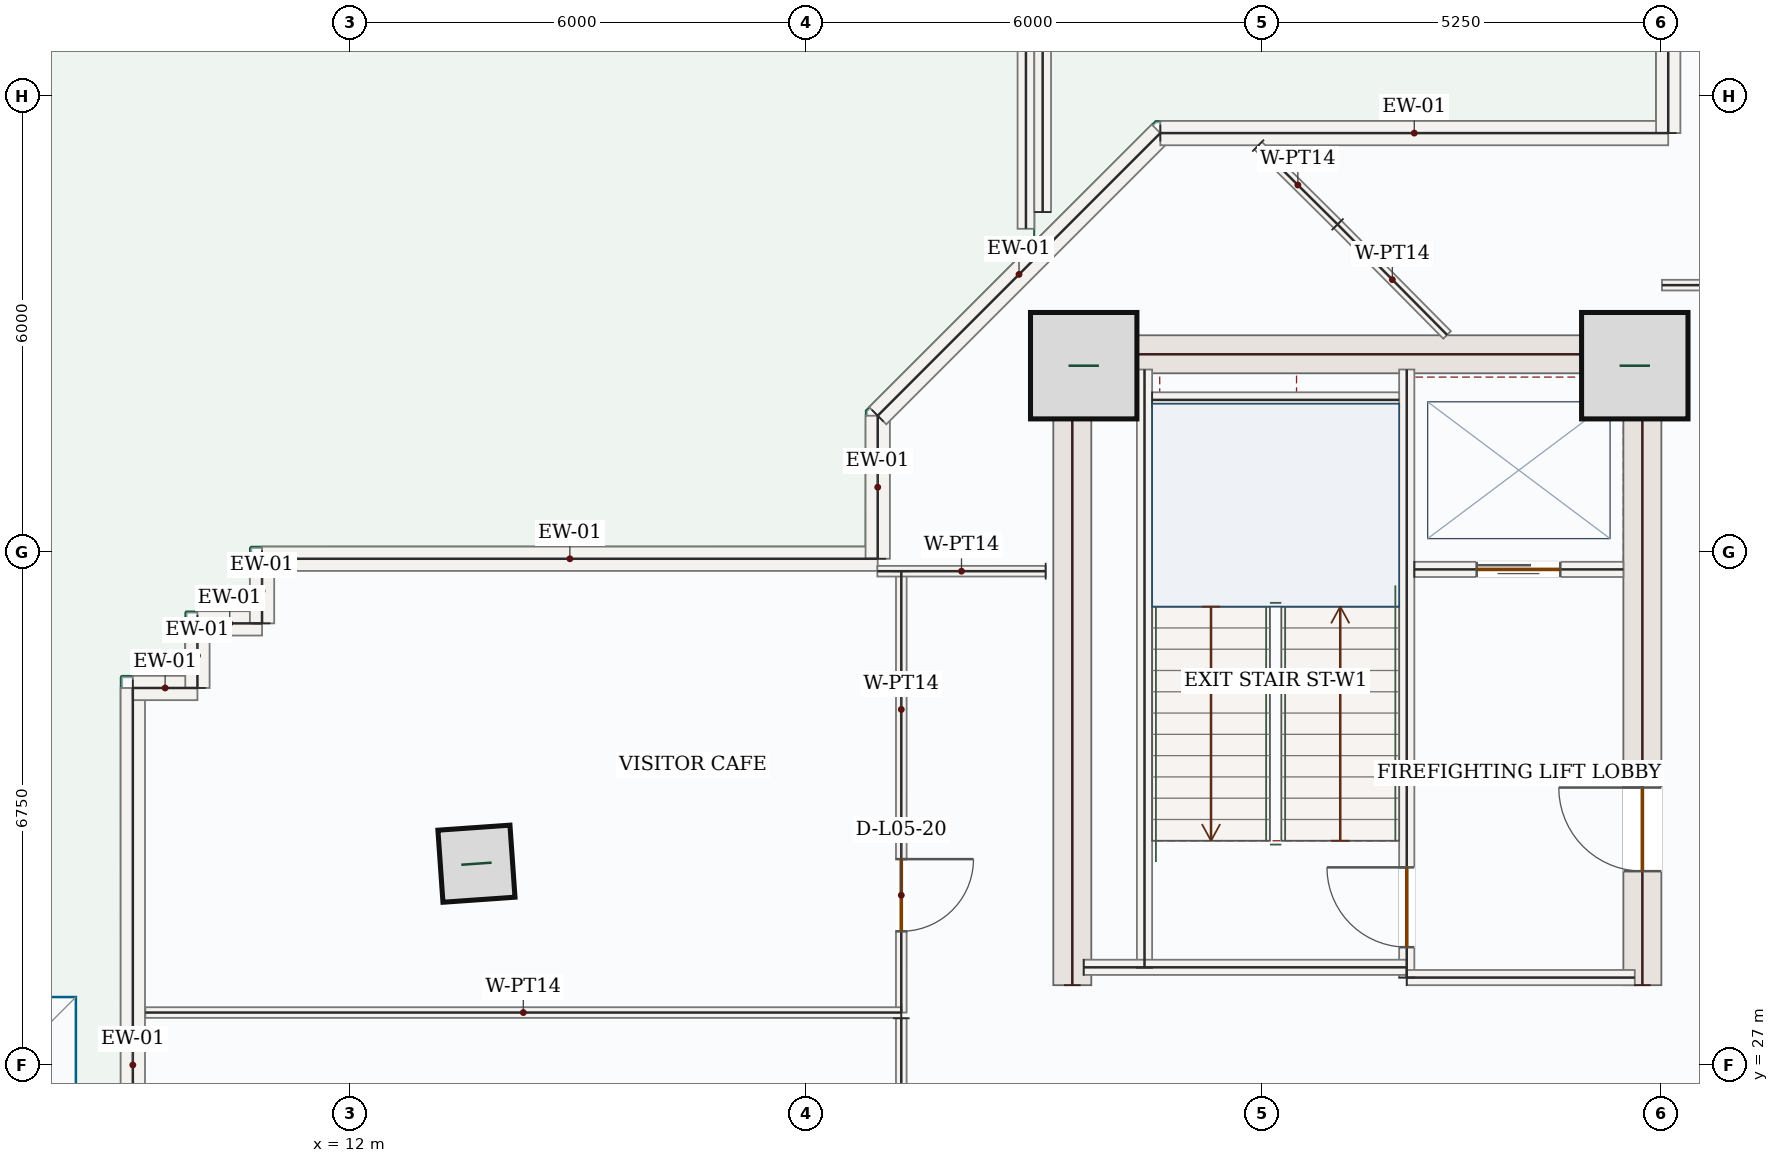
"""IFC4 building model, lengths in metres.
Left out: names, types, materials, properties, quantities, classifications, styles, units other than length and angle.
Written with IfcOpenShell. Run it as: python <this file> out.ifc"""

import sys

from ifc_helpers import new_model, si_unit, direction, frame, frame_2d, origin, origin_2d, place, context, subcontext, project, spatial, rectangle, hollow_rectangle, extrude, source, transform, mapped, element, fill, save


model = new_model("IFC4")
c1 = context("Model", 3, precision=1e-05, world=origin(), true_north=direction((0.0, 1.0)))
c2 = subcontext(c1, "Body", "Model", "MODEL_VIEW")
j1 = project(units=[si_unit("LENGTHUNIT", "METRE"), si_unit("PLANEANGLEUNIT", "RADIAN")], contexts=[c1])
p1 = place(None, origin())
s1 = spatial("IfcSite", under=j1, at=p1, CompositionType="ELEMENT")
p2 = place(p1, origin())
s2 = spatial("IfcBuilding", under=s1, at=p2, CompositionType="ELEMENT")
p3 = place(p2, frame((0.0, 0.0, 29.1)))
s3 = spatial("IfcBuildingStorey", under=s2, at=p3, CompositionType="ELEMENT", Elevation=29.1)
m1 = source(origin(), c2, "Body", "SweptSolid", [
    extrude(rectangle(XDim=8.55, YDim=0.5, at=frame_2d((4.275, 0.0))), origin(), (0.0, 0.0, 1.0), 3.95),
])
p4 = place(p3, frame((21.5, 28.05, 0.0), z_axis=(0.0, 0.0, 1.0), x_axis=(0.0, 1.0, 0.0)))
e1 = element("IfcWall", 1, at=p4, inside=s3, PredefinedType="SHEAR", context=c2, shape_type="MappedRepresentation", body=[
    mapped(m1, transform((0.0, 0.0, 0.0), x_axis=(1.0, 0.0, 0.0), y_axis=(0.0, 1.0, 0.0), z_axis=(0.0, 0.0, 1.0), scale=1.0)),
])
p5 = place(p3, frame((29.0, 28.05, 0.0), z_axis=(0.0, 0.0, 1.0), x_axis=(0.0, 1.0, 0.0)))
e2 = element("IfcWall", 2, at=p5, inside=s3, PredefinedType="SHEAR", context=c2, shape_type="SweptSolid", body=[
    extrude(rectangle(XDim=8.55, YDim=0.5, at=frame_2d((4.275, 0.0))), origin(), (0.0, 0.0, 1.0), 3.95),
])
p6 = place(p5, frame((1.5, 0.0, 0.0)))
e3 = element("IfcOpeningElement", 3, at=p6, cuts=e2, PredefinedType="OPENING", context=c2, shape_type="SweptSolid", body=[
    extrude(rectangle(XDim=1.1, YDim=2.2, at=frame_2d((0.55, 1.1))), frame((0.0, 0.26, 0.0), z_axis=(0.0, -1.0, 0.0), x_axis=(1.0, 0.0, 0.0)), (0.0, 0.0, 1.0), 0.52),
])
m2 = source(origin(), c2, "Body", "SweptSolid", [
    extrude(rectangle(XDim=7.0, YDim=0.5, at=frame_2d((3.5, 0.0))), origin(), (0.0, 0.0, 1.0), 3.95),
])
p7 = place(p3, frame((21.75, 36.35, 0.0), z_axis=(0.0, 0.0, 1.0), x_axis=(1.0, 0.0, 0.0)))
e4 = element("IfcWall", 4, at=p7, inside=s3, PredefinedType="SHEAR", context=c2, shape_type="MappedRepresentation", body=[
    mapped(m2, transform((0.0, 0.0, 0.0), x_axis=(1.0, 0.0, 0.0), y_axis=(0.0, 1.0, 0.0), z_axis=(0.0, 0.0, 1.0), scale=1.0)),
])
m3 = source(origin(), c2, "Body", "SweptSolid", [
    extrude(rectangle(XDim=1.4, YDim=1.4, at=origin_2d()), origin(), (0.0, 0.0, 1.0), 4.2),
])
for number, where, z_axis, x_axis in (
    (5, (21.65, 36.2, 0.0), (0.0, 0.0, 1.0), (1.0, 0.0, 0.0)),
    (6, (28.9, 36.2, 0.0), (0.0, 0.0, 1.0), (1.0, 0.0, 0.0)),
):
    element("IfcColumn", number, at=place(p3, frame(where, z_axis=z_axis, x_axis=x_axis)), inside=s3, PredefinedType="COLUMN", context=c2, shape_type="MappedRepresentation", body=[
        mapped(m3, transform((0.0, 0.0, 0.0), x_axis=(1.0, 0.0, 0.0), y_axis=(0.0, 1.0, 0.0), z_axis=(0.0, 0.0, 1.0), scale=1.0)),
    ])
m4 = source(origin(), c2, "Body", "SweptSolid", [
    extrude(hollow_rectangle(XDim=0.95, YDim=0.95, WallThickness=0.05, at=origin_2d()), origin(), (0.0, 0.0, 1.0), 4.2),
])
p8 = place(p3, frame((13.661, 29.648, 0.0), z_axis=(0.0, 0.0, 1.0), x_axis=(0.99756405026, 0.069756473744, 0.0)))
e7 = element("IfcColumn", 7, at=p8, inside=s3, PredefinedType="COLUMN", context=c2, shape_type="MappedRepresentation", body=[
    mapped(m4, transform((0.0, 0.0, 0.0), x_axis=(1.0, 0.0, 0.0), y_axis=(0.0, 1.0, 0.0), z_axis=(0.0, 0.0, 1.0), scale=1.0)),
])
m5 = source(origin(), c2, "Body", "SweptSolid", [
    extrude(rectangle(XDim=10.889, YDim=0.22, at=frame_2d((5.444, 0.0))), origin(), (0.0, 0.0, 1.0), 1.2),
])
p9 = place(p3, frame((20.89, 48.89, 0.0), z_axis=(0.0, 0.0, 1.0), x_axis=(0.0, -1.0, 0.0)))
e8 = element("IfcWall", 8, at=p9, inside=s3, PredefinedType="PARAPET", context=c2, shape_type="MappedRepresentation", body=[
    mapped(m5, transform((0.0, 0.0, 0.0), x_axis=(1.0, 0.0, 0.0), y_axis=(0.0, 1.0, 0.0), z_axis=(0.0, 0.0, 1.0), scale=1.0)),
])
m6 = source(origin(), c2, "Body", "SweptSolid", [
    extrude(rectangle(XDim=10.669, YDim=0.22, at=frame_2d((5.334, 0.0))), origin(), (0.0, 0.0, 1.0), 1.2),
])
p10 = place(p3, frame((21.11, 38.221, 0.0), z_axis=(0.0, 0.0, 1.0), x_axis=(0.0, 1.0, 0.0)))
e9 = element("IfcWall", 9, at=p10, inside=s3, PredefinedType="PARAPET", context=c2, shape_type="MappedRepresentation", body=[
    mapped(m6, transform((0.0, 0.0, 0.0), x_axis=(1.0, 0.0, 0.0), y_axis=(0.0, 1.0, 0.0), z_axis=(0.0, 0.0, 1.0), scale=1.0)),
])
m7 = source(origin(), c2, "Body", "SweptSolid", [
    extrude(rectangle(XDim=9.92, YDim=0.32, at=frame_2d((4.96, 0.0))), origin(), (0.0, 0.0, 1.0), 3.95),
])
p11 = place(p3, frame((9.14, 22.04, 0.0), z_axis=(0.0, 0.0, 1.0), x_axis=(0.0, 1.0, 0.0)))
e10 = element("IfcWall", 10, at=p11, inside=s3, PredefinedType="SOLIDWALL", context=c2, shape_type="MappedRepresentation", body=[
    mapped(m7, transform((0.0, 0.0, 0.0), x_axis=(1.0, 0.0, 0.0), y_axis=(0.0, 1.0, 0.0), z_axis=(0.0, 0.0, 1.0), scale=1.0)),
])
m8 = source(origin(), c2, "Body", "SweptSolid", [
    extrude(rectangle(XDim=0.85, YDim=0.32, at=frame_2d((0.425, 0.0))), origin(), (0.0, 0.0, 1.0), 3.95),
])
for number, where, z_axis, x_axis in (
    (11, (9.14, 31.96, 0.0), (0.0, 0.0, 1.0), (1.0, 0.0, 0.0)),
    (12, (9.99, 31.96, 0.0), (0.0, 0.0, 1.0), (0.0, 1.0, 0.0)),
    (13, (9.99, 32.81, 0.0), (0.0, 0.0, 1.0), (1.0, 0.0, 0.0)),
):
    element("IfcWall", number, at=place(p3, frame(where, z_axis=z_axis, x_axis=x_axis)), inside=s3, PredefinedType="SOLIDWALL", context=c2, shape_type="MappedRepresentation", body=[
        mapped(m8, transform((0.0, 0.0, 0.0), x_axis=(1.0, 0.0, 0.0), y_axis=(0.0, 1.0, 0.0), z_axis=(0.0, 0.0, 1.0), scale=1.0)),
    ])
m9 = source(origin(), c2, "Body", "SweptSolid", [
    extrude(rectangle(XDim=0.85, YDim=0.32, at=frame_2d((0.425, 0.0))), origin(), (0.0, 0.0, 1.0), 3.95),
])
p12 = place(p3, frame((10.84, 32.81, 0.0), z_axis=(0.0, 0.0, 1.0), x_axis=(0.0, 1.0, 0.0)))
e14 = element("IfcWall", 14, at=p12, inside=s3, PredefinedType="SOLIDWALL", context=c2, shape_type="MappedRepresentation", body=[
    mapped(m9, transform((0.0, 0.0, 0.0), x_axis=(1.0, 0.0, 0.0), y_axis=(0.0, 1.0, 0.0), z_axis=(0.0, 0.0, 1.0), scale=1.0)),
])
m10 = source(origin(), c2, "Body", "SweptSolid", [
    extrude(rectangle(XDim=8.1, YDim=0.32, at=frame_2d((4.05, 0.0))), origin(), (0.0, 0.0, 1.0), 3.95),
])
p13 = place(p3, frame((10.84, 33.66, 0.0), z_axis=(0.0, 0.0, 1.0), x_axis=(1.0, 0.0, 0.0)))
e15 = element("IfcWall", 15, at=p13, inside=s3, PredefinedType="SOLIDWALL", context=c2, shape_type="MappedRepresentation", body=[
    mapped(m10, transform((0.0, 0.0, 0.0), x_axis=(1.0, 0.0, 0.0), y_axis=(0.0, 1.0, 0.0), z_axis=(0.0, 0.0, 1.0), scale=1.0)),
])
m11 = source(origin(), c2, "Body", "SweptSolid", [
    extrude(rectangle(XDim=1.882, YDim=0.32, at=frame_2d((0.941, 0.0))), origin(), (0.0, 0.0, 1.0), 3.95),
])
p14 = place(p3, frame((18.94, 33.66, 0.0), z_axis=(0.0, 0.0, 1.0), x_axis=(0.0, 1.0, 0.0)))
e16 = element("IfcWall", 16, at=p14, inside=s3, PredefinedType="SOLIDWALL", context=c2, shape_type="MappedRepresentation", body=[
    mapped(m11, transform((0.0, 0.0, 0.0), x_axis=(1.0, 0.0, 0.0), y_axis=(0.0, 1.0, 0.0), z_axis=(0.0, 0.0, 1.0), scale=1.0)),
])
m12 = source(origin(), c2, "Body", "SweptSolid", [
    extrude(rectangle(XDim=5.258, YDim=0.32, at=frame_2d((2.629, 0.0))), origin(), (0.0, 0.0, 1.0), 3.95),
])
p15 = place(p3, frame((18.94, 35.542, 0.0), z_axis=(0.0, 0.0, 1.0), x_axis=(0.707106781187, 0.707106781187, 0.0)))
e17 = element("IfcWall", 17, at=p15, inside=s3, PredefinedType="SOLIDWALL", context=c2, shape_type="MappedRepresentation", body=[
    mapped(m12, transform((0.0, 0.0, 0.0), x_axis=(1.0, 0.0, 0.0), y_axis=(0.0, 1.0, 0.0), z_axis=(0.0, 0.0, 1.0), scale=1.0)),
])
m13 = source(origin(), c2, "Body", "SweptSolid", [
    extrude(rectangle(XDim=6.682, YDim=0.32, at=frame_2d((3.341, 0.0))), origin(), (0.0, 0.0, 1.0), 3.95),
])
p16 = place(p3, frame((22.658, 39.26, 0.0), z_axis=(0.0, 0.0, 1.0), x_axis=(1.0, 0.0, 0.0)))
e18 = element("IfcWall", 18, at=p16, inside=s3, PredefinedType="SOLIDWALL", context=c2, shape_type="MappedRepresentation", body=[
    mapped(m13, transform((0.0, 0.0, 0.0), x_axis=(1.0, 0.0, 0.0), y_axis=(0.0, 1.0, 0.0), z_axis=(0.0, 0.0, 1.0), scale=1.0)),
])
m14 = source(origin(), c2, "Body", "SweptSolid", [
    extrude(rectangle(XDim=11.9, YDim=0.32, at=frame_2d((5.95, 0.0))), origin(), (0.0, 0.0, 1.0), 3.01),
])
p17 = place(p3, frame((29.34, 39.26, 0.0), z_axis=(0.0, 0.0, 1.0), x_axis=(0.0, 1.0, 0.0)))
e19 = element("IfcWall", 19, at=p17, inside=s3, PredefinedType="SOLIDWALL", context=c2, shape_type="MappedRepresentation", body=[
    mapped(m14, transform((0.0, 0.0, 0.0), x_axis=(1.0, 0.0, 0.0), y_axis=(0.0, 1.0, 0.0), z_axis=(0.0, 0.0, 1.0), scale=1.0)),
])
m15 = source(origin(), c2, "Body", "SweptSolid", [
    extrude(rectangle(XDim=7.87, YDim=0.2, at=frame_2d((3.935, 0.0))), origin(), (0.0, 0.0, 1.0), 3.95),
])
p18 = place(p3, frame((22.45, 28.28, 0.0), z_axis=(0.0, 0.0, 1.0), x_axis=(0.0, 1.0, 0.0)))
e20 = element("IfcWall", 20, at=p18, inside=s3, PredefinedType="SOLIDWALL", context=c2, shape_type="MappedRepresentation", body=[
    mapped(m15, transform((0.0, 0.0, 0.0), x_axis=(1.0, 0.0, 0.0), y_axis=(0.0, 1.0, 0.0), z_axis=(0.0, 0.0, 1.0), scale=1.0)),
])
p19 = place(p3, frame((25.9, 28.15, 0.0), z_axis=(0.0, 0.0, 1.0), x_axis=(0.0, 1.0, 0.0)))
e21 = element("IfcWall", 21, at=p19, inside=s3, PredefinedType="SOLIDWALL", context=c2, shape_type="SweptSolid", body=[
    extrude(rectangle(XDim=8.0, YDim=0.2, at=frame_2d((4.0, 0.0))), origin(), (0.0, 0.0, 1.0), 3.95),
])
p20 = place(p19, frame((0.4, 0.0, 0.0)))
e22 = element("IfcOpeningElement", 22, at=p20, cuts=e21, PredefinedType="OPENING", context=c2, shape_type="SweptSolid", body=[
    extrude(rectangle(XDim=1.05, YDim=2.15, at=frame_2d((0.525, 1.075))), frame((0.0, 0.11, 0.0), z_axis=(0.0, -1.0, 0.0), x_axis=(1.0, 0.0, 0.0)), (0.0, 0.0, 1.0), 0.22),
])
m16 = source(origin(), c2, "Body", "SweptSolid", [
    extrude(rectangle(XDim=4.25, YDim=0.2, at=frame_2d((2.125, 0.0))), origin(), (0.0, 0.0, 1.0), 3.95),
])
p21 = place(p3, frame((21.65, 28.285, 0.0), z_axis=(0.0, 0.0, 1.0), x_axis=(1.0, 0.0, 0.0)))
e23 = element("IfcWall", 23, at=p21, inside=s3, PredefinedType="SOLIDWALL", context=c2, shape_type="MappedRepresentation", body=[
    mapped(m16, transform((0.0, 0.0, 0.0), x_axis=(1.0, 0.0, 0.0), y_axis=(0.0, 1.0, 0.0), z_axis=(0.0, 0.0, 1.0), scale=1.0)),
])
m17 = source(origin(), c2, "Body", "SweptSolid", [
    extrude(rectangle(XDim=3.0, YDim=0.2, at=frame_2d((1.5, 0.0))), origin(), (0.0, 0.0, 1.0), 3.95),
])
p22 = place(p3, frame((25.9, 28.15, 0.0), z_axis=(0.0, 0.0, 1.0), x_axis=(1.0, 0.0, 0.0)))
e24 = element("IfcWall", 24, at=p22, inside=s3, PredefinedType="SOLIDWALL", context=c2, shape_type="MappedRepresentation", body=[
    mapped(m17, transform((0.0, 0.0, 0.0), x_axis=(1.0, 0.0, 0.0), y_axis=(0.0, 1.0, 0.0), z_axis=(0.0, 0.0, 1.0), scale=1.0)),
])
m18 = source(origin(), c2, "Body", "SweptSolid", [
    extrude(rectangle(XDim=3.25, YDim=0.2, at=frame_2d((1.625, 0.0))), origin(), (0.0, 0.0, 1.0), 3.95),
])
p23 = place(p3, frame((22.55, 35.75, 0.0), z_axis=(0.0, 0.0, 1.0), x_axis=(1.0, 0.0, 0.0)))
e25 = element("IfcWall", 25, at=p23, inside=s3, PredefinedType="SOLIDWALL", context=c2, shape_type="MappedRepresentation", body=[
    mapped(m18, transform((0.0, 0.0, 0.0), x_axis=(1.0, 0.0, 0.0), y_axis=(0.0, 1.0, 0.0), z_axis=(0.0, 0.0, 1.0), scale=1.0)),
])
p24 = place(p3, frame((26.0, 33.52, 0.0), z_axis=(0.0, 0.0, 1.0), x_axis=(1.0, 0.0, 0.0)))
e26 = element("IfcWall", 26, at=p24, inside=s3, PredefinedType="SOLIDWALL", context=c2, shape_type="SweptSolid", body=[
    extrude(rectangle(XDim=2.75, YDim=0.2, at=frame_2d((1.375, 0.0))), origin(), (0.0, 0.0, 1.0), 3.95),
])
p25 = place(p24, frame((0.82, 0.0, 0.0)))
e27 = element("IfcOpeningElement", 27, at=p25, cuts=e26, PredefinedType="OPENING", context=c2, shape_type="SweptSolid", body=[
    extrude(rectangle(XDim=1.1, YDim=2.15, at=frame_2d((0.55, 1.075))), frame((0.0, 0.11, 0.0), z_axis=(0.0, -1.0, 0.0), x_axis=(1.0, 0.0, 0.0)), (0.0, 0.0, 1.0), 0.22),
])
p26 = place(p3, frame((19.25, 33.496, 0.0), z_axis=(0.0, 0.0, 1.0), x_axis=(-8.409368e-05, -0.999999996464, 0.0)))
e28 = element("IfcWall", 28, at=p26, inside=s3, PredefinedType="PARTITIONING", context=c2, shape_type="SweptSolid", body=[
    extrude(rectangle(XDim=5.806, YDim=0.14, at=frame_2d((2.903, 0.0))), origin(), (0.0, 0.0, 1.0), 3.95),
])
p27 = place(p26, frame((3.788, 0.0, 0.0)))
e29 = element("IfcOpeningElement", 29, at=p27, cuts=e28, PredefinedType="OPENING", context=c2, shape_type="SweptSolid", body=[
    extrude(rectangle(XDim=0.95, YDim=2.15, at=frame_2d((0.475, 1.075))), frame((0.0, 0.08, 0.0), z_axis=(0.0, -1.0, 0.0), x_axis=(1.0, 0.0, 0.0)), (0.0, 0.0, 1.0), 0.16),
])
m19 = source(origin(), c2, "Body", "SweptSolid", [
    extrude(rectangle(XDim=9.945, YDim=0.14, at=frame_2d((4.973, 0.0))), origin(), (0.0, 0.0, 1.0), 3.95),
])
p28 = place(p3, frame((19.25, 27.69, 0.0), z_axis=(0.0, 0.0, 1.0), x_axis=(-1.0, 0.0, 0.0)))
e30 = element("IfcWall", 30, at=p28, inside=s3, PredefinedType="PARTITIONING", context=c2, shape_type="MappedRepresentation", body=[
    mapped(m19, transform((0.0, 0.0, 0.0), x_axis=(1.0, 0.0, 0.0), y_axis=(0.0, 1.0, 0.0), z_axis=(0.0, 0.0, 1.0), scale=1.0)),
])
m20 = source(origin(), c2, "Body", "SweptSolid", [
    extrude(rectangle(XDim=1.471, YDim=0.14, at=frame_2d((0.736, 0.0))), origin(), (0.0, 0.0, 1.0), 3.95),
])
p29 = place(p3, frame((23.945, 39.095, 0.0), z_axis=(0.0, 0.0, 1.0), x_axis=(0.710417151562, -0.703780840011, 0.0)))
e31 = element("IfcWall", 31, at=p29, inside=s3, PredefinedType="PARTITIONING", context=c2, shape_type="MappedRepresentation", body=[
    mapped(m20, transform((0.0, 0.0, 0.0), x_axis=(1.0, 0.0, 0.0), y_axis=(0.0, 1.0, 0.0), z_axis=(0.0, 0.0, 1.0), scale=1.0)),
])
m21 = source(origin(), c2, "Body", "SweptSolid", [
    extrude(rectangle(XDim=2.047, YDim=0.14, at=frame_2d((1.024, 0.0))), origin(), (0.0, 0.0, 1.0), 3.95),
])
p30 = place(p3, frame((24.99, 38.059, 0.0), z_axis=(0.0, 0.0, 1.0), x_axis=(0.703819772346, -0.710378580797, 0.0)))
e32 = element("IfcWall", 32, at=p30, inside=s3, PredefinedType="PARTITIONING", context=c2, shape_type="MappedRepresentation", body=[
    mapped(m21, transform((0.0, 0.0, 0.0), x_axis=(1.0, 0.0, 0.0), y_axis=(0.0, 1.0, 0.0), z_axis=(0.0, 0.0, 1.0), scale=1.0)),
])
m22 = source(origin(), c2, "Body", "SweptSolid", [
    extrude(rectangle(XDim=2.214, YDim=0.14, at=frame_2d((1.107, 0.0))), origin(), (0.0, 0.0, 1.0), 3.95),
])
p31 = place(p3, frame((21.149, 33.497, 0.0), z_axis=(0.0, 0.0, 1.0), x_axis=(-0.999999993922, -0.000110253583, 0.0)))
e33 = element("IfcWall", 33, at=p31, inside=s3, PredefinedType="PARTITIONING", context=c2, shape_type="MappedRepresentation", body=[
    mapped(m22, transform((0.0, 0.0, 0.0), x_axis=(1.0, 0.0, 0.0), y_axis=(0.0, 1.0, 0.0), z_axis=(0.0, 0.0, 1.0), scale=1.0)),
])
p32 = place(p3, frame((19.25, 27.615, 0.0), z_axis=(0.0, 0.0, 1.0), x_axis=(0.0, -1.0, 0.0)))
e34 = element("IfcWall", 34, at=p32, inside=s3, PredefinedType="PARTITIONING", context=c2, shape_type="SweptSolid", body=[
    extrude(rectangle(XDim=7.109, YDim=0.14, at=frame_2d((3.555, 0.0))), origin(), (0.0, 0.0, 1.0), 3.95),
])
p33 = place(p32, frame((2.156, 0.0, 0.0)))
e35 = element("IfcOpeningElement", 35, at=p33, cuts=e34, PredefinedType="OPENING", context=c2, shape_type="SweptSolid", body=[
    extrude(rectangle(XDim=0.95, YDim=2.15, at=frame_2d((0.475, 1.075))), frame((0.0, 0.08, 0.0), z_axis=(0.0, -1.0, 0.0), x_axis=(1.0, 0.0, 0.0)), (0.0, 0.0, 1.0), 0.16),
])
p34 = place(p3, frame((36.615, 37.26, 0.0), z_axis=(0.0, 0.0, 1.0), x_axis=(-0.999999999449, -3.3182904e-05, 0.0)))
e36 = element("IfcWall", 36, at=p34, inside=s3, PredefinedType="PARTITIONING", context=c2, shape_type="SweptSolid", body=[
    extrude(rectangle(XDim=7.357, YDim=0.14, at=frame_2d((3.679, 0.0))), origin(), (0.0, 0.0, 1.0), 3.95),
])
p35 = place(p34, frame((1.41, 0.0, 0.0)))
e37 = element("IfcOpeningElement", 37, at=p35, cuts=e36, PredefinedType="OPENING", context=c2, shape_type="SweptSolid", body=[
    extrude(rectangle(XDim=0.95, YDim=2.15, at=frame_2d((0.475, 1.075))), frame((0.0, 0.08, 0.0), z_axis=(0.0, -1.0, 0.0), x_axis=(1.0, 0.0, 0.0)), (0.0, 0.0, 1.0), 0.16),
])
p36 = place(p3, frame((0.0, 0.0, -0.22)))
p37 = place(p36, frame((7.491, 26.994, 0.0)))
p38 = place(p37, frame((0.0, 0.0, 0.22)))
e38 = element("IfcWindow", 38, at=p38, inside=s3, PartitioningType="SINGLE_PANEL", PredefinedType="SKYLIGHT", context=c2, shape_type="SweptSolid", body=[
    extrude(rectangle(XDim=1.8, YDim=1.8, at=origin_2d()), origin(), (0.0, 0.0, 1.0), 0.05),
])
m23 = source(origin(), c2, "Body", "SweptSolid", [
    extrude(rectangle(XDim=1.05, YDim=2.15, at=frame_2d((0.525, 1.075))), frame((0.0, 0.025, 0.0), z_axis=(0.0, -1.0, 0.0), x_axis=(1.0, 0.0, 0.0)), (0.0, 0.0, 1.0), 0.05),
])
p39 = place(p20, origin())
e39 = element("IfcDoor", 39, at=p39, inside=s3, OperationType="SINGLE_SWING_RIGHT", PredefinedType="DOOR", context=c2, shape_type="MappedRepresentation", body=[
    mapped(m23, transform((0.0, 0.0, 0.0), x_axis=(1.0, 0.0, 0.0), y_axis=(0.0, 1.0, 0.0), z_axis=(0.0, 0.0, 1.0), scale=1.0)),
])
fill(e22, e39)
m24 = source(origin(), c2, "Body", "SweptSolid", [
    extrude(rectangle(XDim=1.1, YDim=2.15, at=frame_2d((0.55, 1.075))), frame((0.0, 0.025, 0.0), z_axis=(0.0, -1.0, 0.0), x_axis=(1.0, 0.0, 0.0)), (0.0, 0.0, 1.0), 0.05),
])
p40 = place(p25, origin())
e40 = element("IfcDoor", 40, at=p40, inside=s3, OperationType="DOUBLE_DOOR_SLIDING", PredefinedType="DOOR", context=c2, shape_type="MappedRepresentation", body=[
    mapped(m24, transform((0.0, 0.0, 0.0), x_axis=(1.0, 0.0, 0.0), y_axis=(0.0, 1.0, 0.0), z_axis=(0.0, 0.0, 1.0), scale=1.0)),
])
fill(e27, e40)
m25 = source(origin(), c2, "Body", "SweptSolid", [
    extrude(rectangle(XDim=1.1, YDim=2.2, at=frame_2d((0.55, 1.1))), frame((0.0, 0.025, 0.0), z_axis=(0.0, -1.0, 0.0), x_axis=(1.0, 0.0, 0.0)), (0.0, 0.0, 1.0), 0.05),
])
p41 = place(p6, origin())
e41 = element("IfcDoor", 41, at=p41, inside=s3, OperationType="SINGLE_SWING_RIGHT", PredefinedType="DOOR", context=c2, shape_type="MappedRepresentation", body=[
    mapped(m25, transform((0.0, 0.0, 0.0), x_axis=(1.0, 0.0, 0.0), y_axis=(0.0, 1.0, 0.0), z_axis=(0.0, 0.0, 1.0), scale=1.0)),
])
fill(e3, e41)
m26 = source(origin(), c2, "Body", "SweptSolid", [
    extrude(rectangle(XDim=0.95, YDim=2.15, at=frame_2d((0.475, 1.075))), frame((0.0, 0.025, 0.0), z_axis=(0.0, -1.0, 0.0), x_axis=(1.0, 0.0, 0.0)), (0.0, 0.0, 1.0), 0.05),
])
p42 = place(p27, origin())
e42 = element("IfcDoor", 42, at=p42, inside=s3, OperationType="SINGLE_SWING_LEFT", PredefinedType="DOOR", context=c2, shape_type="MappedRepresentation", body=[
    mapped(m26, transform((0.0, 0.0, 0.0), x_axis=(1.0, 0.0, 0.0), y_axis=(0.0, 1.0, 0.0), z_axis=(0.0, 0.0, 1.0), scale=1.0)),
])
fill(e29, e42)
save(model, sys.argv[1])
